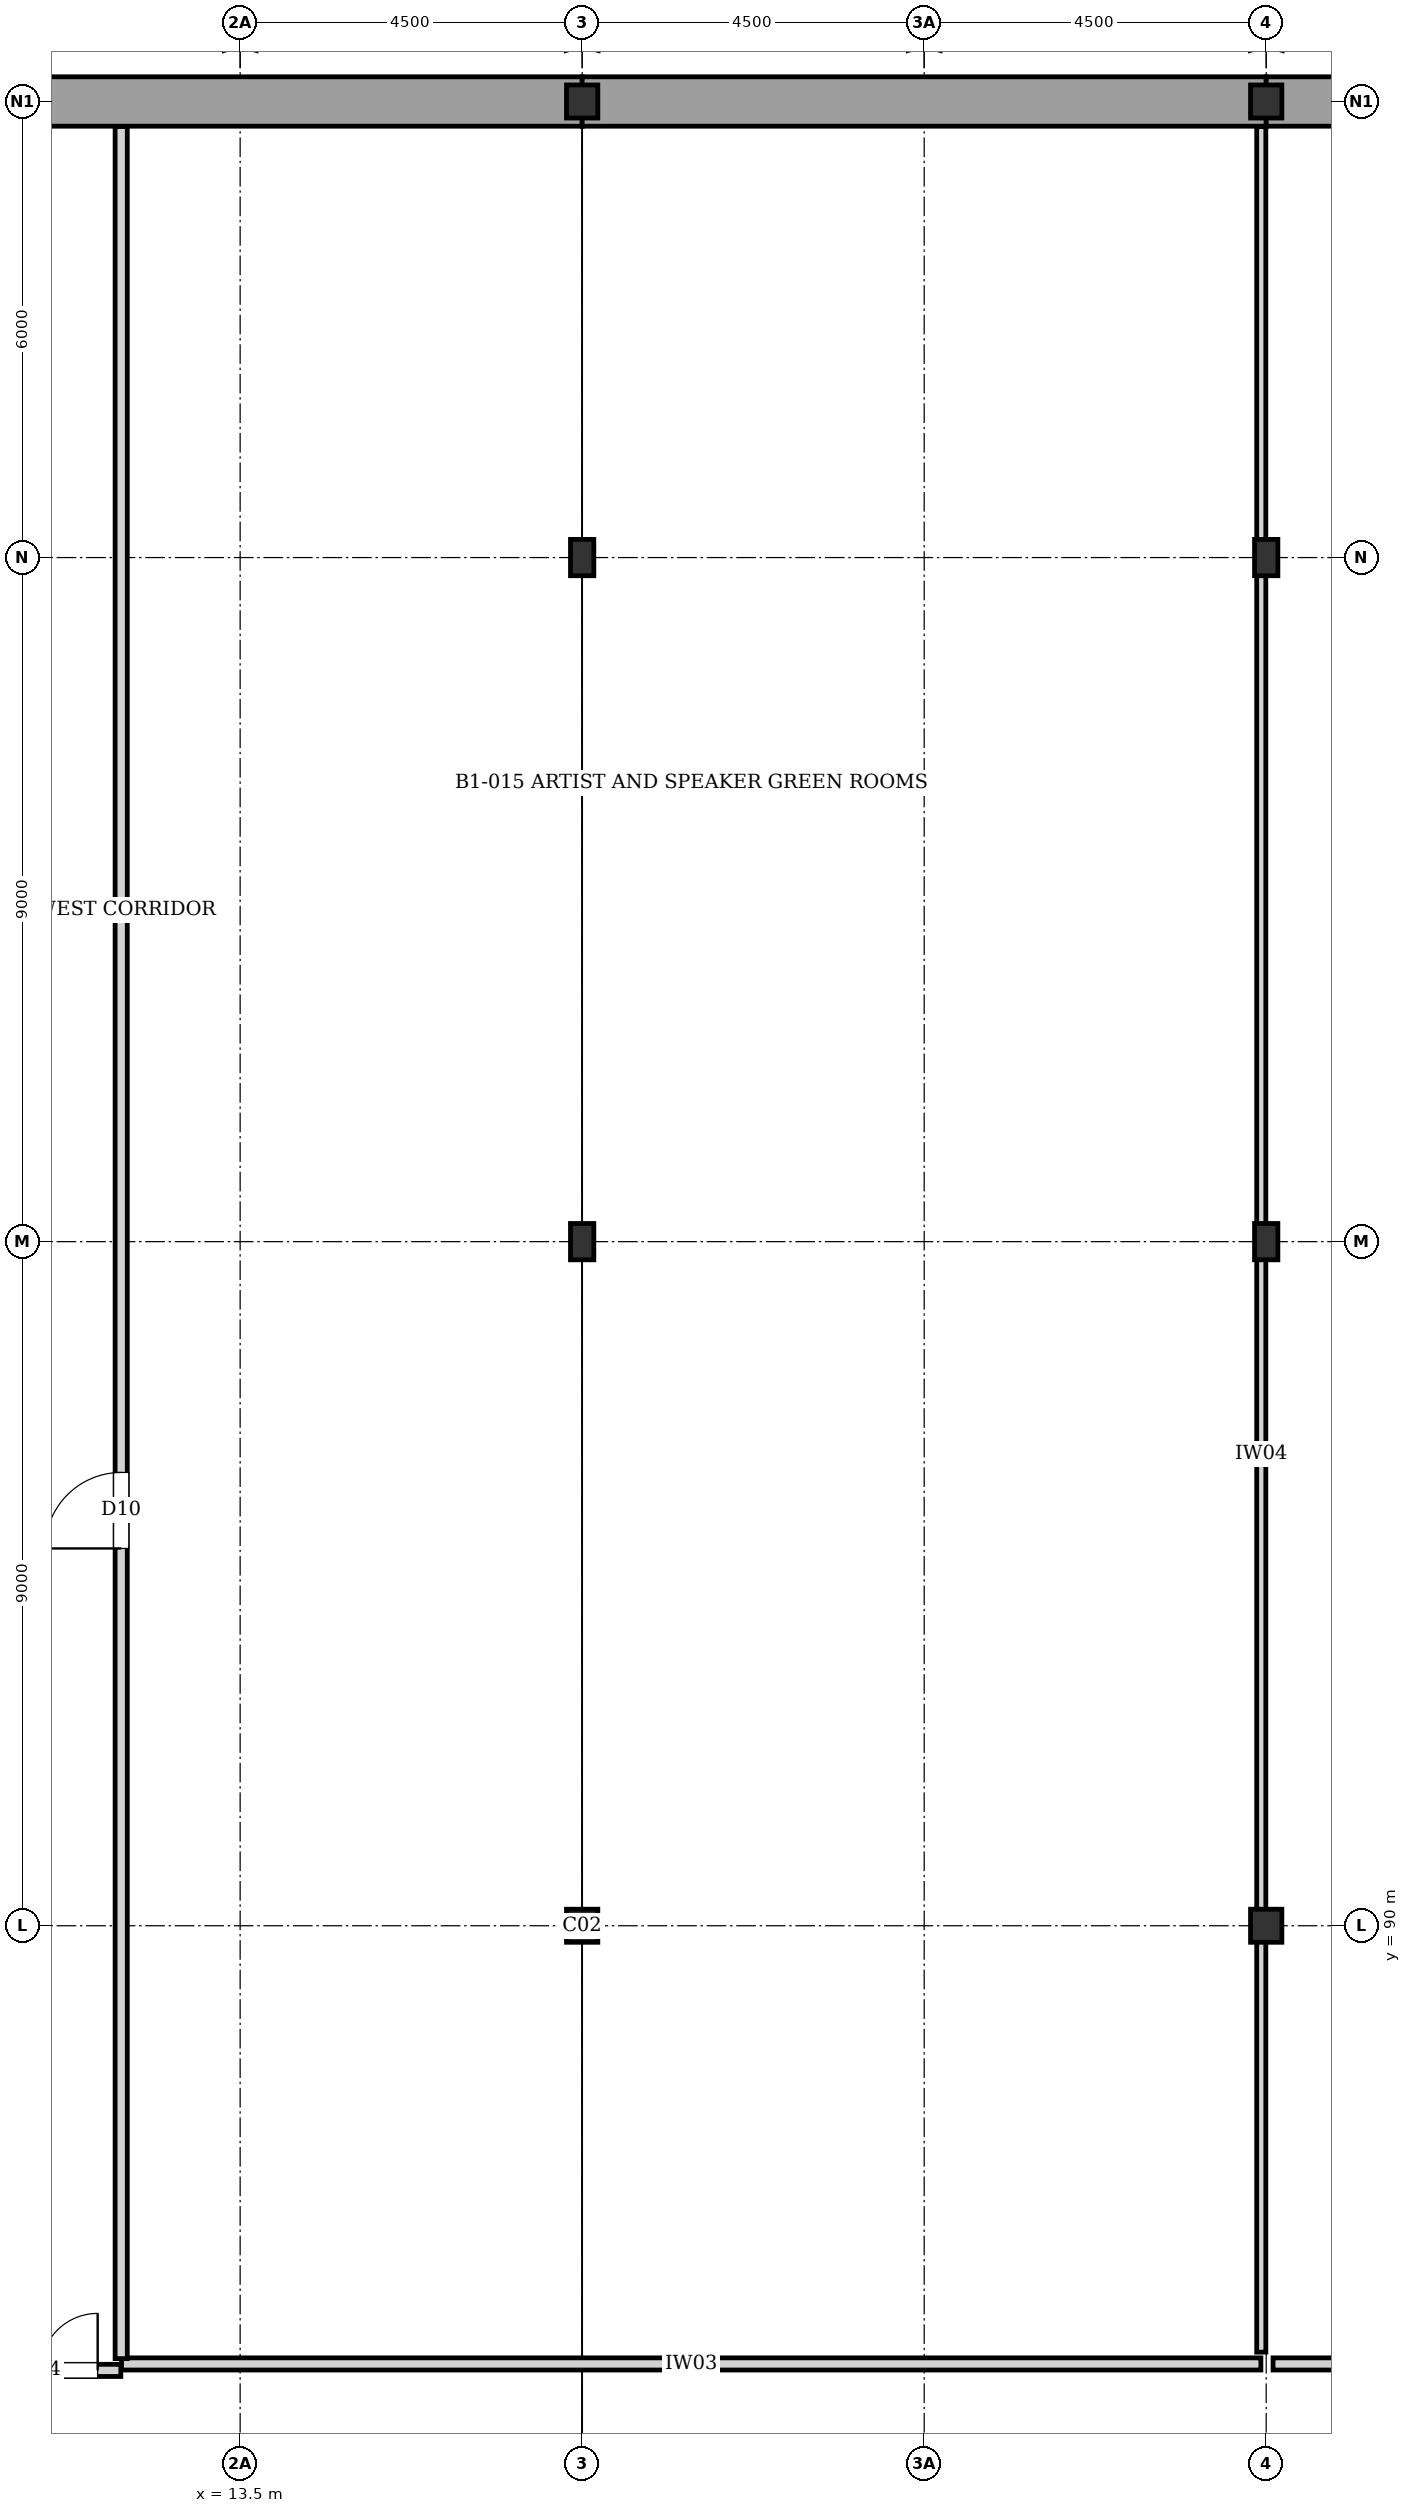
"""IFC4 building model, lengths in metres.
Left out: names, types, materials, properties, quantities, classifications, styles, units other than length and angle.
Written with IfcOpenShell. Run it as: python <this file> out.ifc"""

import sys

from ifc_helpers import new_model, si_unit, direction, frame, frame_2d, origin, origin_2d, place, context, subcontext, project, spatial, rectangle, i_section, extrude, element, fill, save


model = new_model("IFC4")
c1 = context("Model", 3, precision=1e-05, world=origin(), true_north=direction((0.0, 1.0)))
c2 = subcontext(c1, "Body", "Model", "MODEL_VIEW")
j1 = project(units=[si_unit("LENGTHUNIT", "METRE"), si_unit("PLANEANGLEUNIT", "RADIAN")], contexts=[c1])
p1 = place(None, origin())
s1 = spatial("IfcSite", under=j1, at=p1, CompositionType="ELEMENT")
p2 = place(p1, origin())
s2 = spatial("IfcBuilding", under=s1, at=p2, CompositionType="ELEMENT")
p3 = place(p2, frame((0.0, 0.0, -4.48)))
s3 = spatial("IfcBuildingStorey", under=s2, at=p3, CompositionType="ELEMENT", Elevation=-4.48)
p4 = place(p3, frame((18.0, 90.0, 0.0), z_axis=(0.0, 0.0, 1.0), x_axis=(1.0, 0.0, 0.0)))
e1 = element("IfcColumn", 1, at=p4, inside=s3, PredefinedType="COLUMN", context=c2, shape_type="SweptSolid", body=[
    extrude(i_section(OverallWidth=0.412, OverallDepth=0.435, WebThickness=0.027, FlangeThickness=0.046, at=origin_2d()), origin(), (0.0, 0.0, 1.0), 4.48),
])
for number, where, z_axis, x_axis in (
    (2, (18.0, 99.0, 0.0), (0.0, 0.0, 1.0), (1.0, 0.0, 0.0)),
    (3, (18.0, 108.0, 0.0), (0.0, 0.0, 1.0), (1.0, 0.0, 0.0)),
):
    element("IfcColumn", number, at=place(p3, frame(where, z_axis=z_axis, x_axis=x_axis)), inside=s3, PredefinedType="COLUMN", context=c2, shape_type="SweptSolid", body=[
        extrude(i_section(OverallWidth=0.307, OverallDepth=0.478, WebThickness=0.021, FlangeThickness=0.04, at=origin_2d()), origin(), (0.0, 0.0, 1.0), 4.48),
    ])
for number, where, z_axis, x_axis in (
    (4, (18.0, 114.0, 0.0), (0.0, 0.0, 1.0), (1.0, 0.0, 0.0)),
    (5, (27.0, 90.0, 0.0), (0.0, 0.0, 1.0), (1.0, 0.0, 0.0)),
):
    element("IfcColumn", number, at=place(p3, frame(where, z_axis=z_axis, x_axis=x_axis)), inside=s3, PredefinedType="COLUMN", context=c2, shape_type="SweptSolid", body=[
        extrude(i_section(OverallWidth=0.412, OverallDepth=0.435, WebThickness=0.027, FlangeThickness=0.046, at=origin_2d()), origin(), (0.0, 0.0, 1.0), 4.48),
    ])
for number, where, z_axis, x_axis in (
    (6, (27.0, 99.0, 0.0), (0.0, 0.0, 1.0), (1.0, 0.0, 0.0)),
    (7, (27.0, 108.0, 0.0), (0.0, 0.0, 1.0), (1.0, 0.0, 0.0)),
):
    element("IfcColumn", number, at=place(p3, frame(where, z_axis=z_axis, x_axis=x_axis)), inside=s3, PredefinedType="COLUMN", context=c2, shape_type="SweptSolid", body=[
        extrude(i_section(OverallWidth=0.307, OverallDepth=0.478, WebThickness=0.021, FlangeThickness=0.04, at=origin_2d()), origin(), (0.0, 0.0, 1.0), 4.48),
    ])
p5 = place(p3, frame((27.0, 114.0, 0.0), z_axis=(0.0, 0.0, 1.0), x_axis=(1.0, 0.0, 0.0)))
e8 = element("IfcColumn", 8, at=p5, inside=s3, PredefinedType="COLUMN", context=c2, shape_type="SweptSolid", body=[
    extrude(i_section(OverallWidth=0.412, OverallDepth=0.435, WebThickness=0.027, FlangeThickness=0.046, at=origin_2d()), origin(), (0.0, 0.0, 1.0), 4.48),
])
for number, where, z_axis, x_axis in (
    (9, (9.0, 114.0, 0.0), (0.0, 0.0, 1.0), (1.0, 0.0, 0.0)),
    (10, (18.0, 114.0, 0.0), (0.0, 0.0, 1.0), (1.0, 0.0, 0.0)),
    (11, (27.0, 114.0, 0.0), (0.0, 0.0, 1.0), (1.0, 0.0, 0.0)),
):
    element("IfcWall", number, at=place(p3, frame(where, z_axis=z_axis, x_axis=x_axis)), inside=s3, PredefinedType="USERDEFINED", context=c2, shape_type="SweptSolid", body=[
        extrude(rectangle(XDim=9.0, YDim=0.65, at=frame_2d((4.5, 0.0))), origin(), (0.0, 0.0, 1.0), 4.18),
    ])
p6 = place(p3, frame((11.94, 84.235, 0.0), z_axis=(0.0, 0.0, 1.0), x_axis=(1.0, 0.0, 0.0)))
e12 = element("IfcWall", 12, at=p6, inside=s3, PredefinedType="PARTITIONING", context=c2, shape_type="SweptSolid", body=[
    extrude(rectangle(XDim=14.99, YDim=0.16, at=frame_2d((7.495, 0.0))), origin(), (0.0, 0.0, 1.0), 4.18),
])
p7 = place(p3, frame((26.935, 84.39, 0.0), z_axis=(0.0, 0.0, 1.0), x_axis=(0.0, 1.0, 0.0)))
e13 = element("IfcWall", 13, at=p7, inside=s3, PredefinedType="PARTITIONING", context=c2, shape_type="SweptSolid", body=[
    extrude(rectangle(XDim=23.63, YDim=0.12, at=frame_2d((11.815, 0.0))), origin(), (0.0, 0.0, 1.0), 3.28),
])
p8 = place(p3, frame((9.155, 84.15, 0.0), z_axis=(0.0, 0.0, 1.0), x_axis=(1.0, 0.0, 0.0)))
e14 = element("IfcWall", 14, at=p8, inside=s3, PredefinedType="PARTITIONING", context=c2, shape_type="SweptSolid", body=[
    extrude(rectangle(XDim=2.775, YDim=0.16, at=frame_2d((1.387, 0.0))), origin(), (0.0, 0.0, 1.0), 4.18),
])
p9 = place(p8, frame((0.97, 0.0, 0.0)))
e15 = element("IfcOpeningElement", 15, at=p9, cuts=e14, PredefinedType="OPENING", context=c2, shape_type="SweptSolid", body=[
    extrude(rectangle(XDim=1.5, YDim=2.1, at=frame_2d((0.75, 1.05))), frame((0.0, 0.09, 0.0), z_axis=(0.0, -1.0, 0.0), x_axis=(1.0, 0.0, 0.0)), (0.0, 0.0, 1.0), 0.18),
])
p10 = place(p3, frame((27.09, 84.235, 0.0), z_axis=(0.0, 0.0, 1.0), x_axis=(1.0, 0.0, 0.0)))
e16 = element("IfcWall", 16, at=p10, inside=s3, PredefinedType="PARTITIONING", context=c2, shape_type="SweptSolid", body=[
    extrude(rectangle(XDim=17.755, YDim=0.16, at=frame_2d((8.877, 0.0))), origin(), (0.0, 0.0, 1.0), 4.18),
])
p11 = place(p10, frame((14.855, 0.0, 0.0)))
e17 = element("IfcOpeningElement", 17, at=p11, cuts=e16, PredefinedType="OPENING", context=c2, shape_type="SweptSolid", body=[
    extrude(rectangle(XDim=1.0, YDim=2.1, at=frame_2d((0.5, 1.05))), frame((0.0, 0.09, 0.0), z_axis=(0.0, -1.0, 0.0), x_axis=(1.0, 0.0, 0.0)), (0.0, 0.0, 1.0), 0.18),
])
p12 = place(p3, frame((11.935, 84.305, 0.0), z_axis=(0.0, 0.0, 1.0), x_axis=(0.0, 1.0, 0.0)))
e18 = element("IfcWall", 18, at=p12, inside=s3, PredefinedType="PARTITIONING", context=c2, shape_type="SweptSolid", body=[
    extrude(rectangle(XDim=29.365, YDim=0.16, at=frame_2d((14.683, 0.0))), origin(), (0.0, 0.0, 1.0), 4.18),
])
p13 = place(p12, frame((10.659, 0.0, 0.0)))
e19 = element("IfcOpeningElement", 19, at=p13, cuts=e18, PredefinedType="OPENING", context=c2, shape_type="SweptSolid", body=[
    extrude(rectangle(XDim=1.0, YDim=2.1, at=frame_2d((0.5, 1.05))), frame((0.0, 0.09, 0.0), z_axis=(0.0, -1.0, 0.0), x_axis=(1.0, 0.0, 0.0)), (0.0, 0.0, 1.0), 0.18),
])
p14 = place(p3, frame((26.935, 108.02, 0.0), z_axis=(0.0, 0.0, 1.0), x_axis=(0.0, 1.0, 0.0)))
e20 = element("IfcWall", 20, at=p14, inside=s3, PredefinedType="PARTITIONING", context=c2, shape_type="SweptSolid", body=[
    extrude(rectangle(XDim=5.65, YDim=0.12, at=frame_2d((2.825, 0.0))), origin(), (0.0, 0.0, 1.0), 3.48),
])
p15 = place(p9, origin())
e21 = element("IfcDoor", 21, at=p15, inside=s3, OperationType="DOUBLE_DOOR_SINGLE_SWING", PredefinedType="DOOR", context=c2, shape_type="SweptSolid", body=[
    extrude(rectangle(XDim=1.5, YDim=2.1, at=frame_2d((0.75, 1.05))), frame((0.0, 0.025, 0.0), z_axis=(0.0, -1.0, 0.0), x_axis=(1.0, 0.0, 0.0)), (0.0, 0.0, 1.0), 0.05),
])
fill(e15, e21)
p16 = place(p13, origin())
e22 = element("IfcDoor", 22, at=p16, inside=s3, OperationType="SINGLE_SWING_LEFT", PredefinedType="DOOR", context=c2, shape_type="SweptSolid", body=[
    extrude(rectangle(XDim=1.0, YDim=2.1, at=frame_2d((0.5, 1.05))), frame((0.0, 0.025, 0.0), z_axis=(0.0, -1.0, 0.0), x_axis=(1.0, 0.0, 0.0)), (0.0, 0.0, 1.0), 0.05),
])
fill(e19, e22)
save(model, sys.argv[1])
